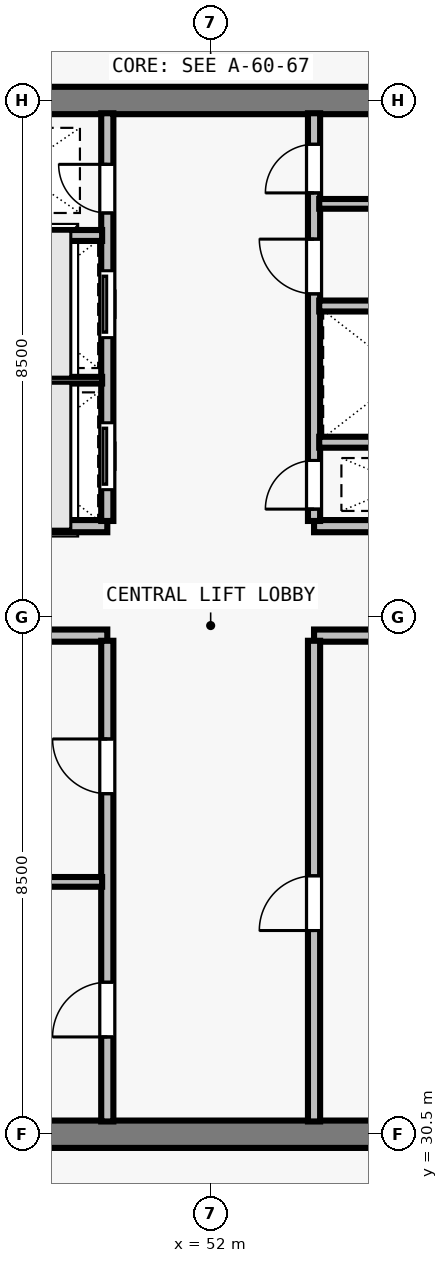
"""IFC4 building model, lengths in metres.
Left out: names, types, materials, properties, quantities, classifications, styles, units other than length and angle.
Written with IfcOpenShell. Run it as: python <this file> out.ifc"""

import sys

from ifc_helpers import new_model, si_unit, direction, frame, frame_2d, origin, place, context, subcontext, project, spatial, rectangle, extrude, element, fill, save


model = new_model("IFC4")
c1 = context("Model", 3, precision=1e-05, world=origin(), true_north=direction((0.0, 1.0)))
c2 = subcontext(c1, "Body", "Model", "MODEL_VIEW")
j1 = project(units=[si_unit("LENGTHUNIT", "METRE"), si_unit("PLANEANGLEUNIT", "RADIAN")], contexts=[c1])
p1 = place(None, origin())
s1 = spatial("IfcSite", under=j1, at=p1, CompositionType="ELEMENT")
p2 = place(p1, origin())
s2 = spatial("IfcBuilding", under=s1, at=p2, CompositionType="ELEMENT")
p3 = place(p2, frame((0.0, 0.0, 234.0)))
s3 = spatial("IfcBuildingStorey", under=s2, at=p3, CompositionType="ELEMENT", Elevation=234.0)
for number, where, z_axis, x_axis in (
    (1, (43.275, 30.5, 0.0), (0.0, 0.0, 1.0), (1.0, 0.0, 0.0)),
    (2, (43.275, 47.5, 0.0), (0.0, 0.0, 1.0), (1.0, 0.0, 0.0)),
):
    element("IfcWall", number, at=place(p3, frame(where, z_axis=z_axis, x_axis=x_axis)), inside=s3, PredefinedType="SHEAR", context=c2, shape_type="SweptSolid", body=[
        extrude(rectangle(XDim=17.45, YDim=0.45, at=frame_2d((8.725, 0.0))), origin(), (0.0, 0.0, 1.0), 3.29),
    ])
for number, where, z_axis, x_axis in (
    (3, (47.35, 38.7, 0.0), (0.0, 0.0, 1.0), (1.0, 0.0, 0.0)),
    (4, (47.35, 40.5, 0.0), (0.0, 0.0, 1.0), (1.0, 0.0, 0.0)),
    (5, (53.7, 38.7, 0.0), (0.0, 0.0, 1.0), (1.0, 0.0, 0.0)),
    (6, (53.7, 40.5, 0.0), (0.0, 0.0, 1.0), (1.0, 0.0, 0.0)),
):
    element("IfcWall", number, at=place(p3, frame(where, z_axis=z_axis, x_axis=x_axis)), inside=s3, PredefinedType="SOLIDWALL", context=c2, shape_type="SweptSolid", body=[
        extrude(rectangle(XDim=2.95, YDim=0.2, at=frame_2d((1.475, 0.0))), origin(), (0.0, 0.0, 1.0), 3.29),
    ])
p4 = place(p3, frame((50.3, 30.71, 0.0), z_axis=(0.0, 0.0, 1.0), x_axis=(0.0, 1.0, 0.0)))
e7 = element("IfcWall", 7, at=p4, inside=s3, PredefinedType="SOLIDWALL", context=c2, shape_type="SweptSolid", body=[
    extrude(rectangle(XDim=7.905, YDim=0.2, at=frame_2d((3.953, 0.0))), origin(), (0.0, 0.0, 1.0), 3.29),
])
p5 = place(p4, frame((1.39, 0.0, 0.0)))
e8 = element("IfcOpeningElement", 8, at=p5, cuts=e7, PredefinedType="OPENING", context=c2, shape_type="SweptSolid", body=[
    extrude(rectangle(XDim=0.9, YDim=2.12, at=frame_2d((0.45, 1.06))), frame((0.0, 0.11, 0.0), z_axis=(0.0, -1.0, 0.0), x_axis=(1.0, 0.0, 0.0)), (0.0, 0.0, 1.0), 0.22),
])
p6 = place(p4, frame((5.39, 0.0, 0.0)))
e9 = element("IfcOpeningElement", 9, at=p6, cuts=e7, PredefinedType="OPENING", context=c2, shape_type="SweptSolid", body=[
    extrude(rectangle(XDim=0.9, YDim=2.12, at=frame_2d((0.45, 1.06))), frame((0.0, 0.11, 0.0), z_axis=(0.0, -1.0, 0.0), x_axis=(1.0, 0.0, 0.0)), (0.0, 0.0, 1.0), 0.22),
])
p7 = place(p3, frame((53.7, 30.71, 0.0), z_axis=(0.0, 0.0, 1.0), x_axis=(0.0, 1.0, 0.0)))
e10 = element("IfcWall", 10, at=p7, inside=s3, PredefinedType="SOLIDWALL", context=c2, shape_type="SweptSolid", body=[
    extrude(rectangle(XDim=7.905, YDim=0.2, at=frame_2d((3.953, 0.0))), origin(), (0.0, 0.0, 1.0), 3.29),
])
p8 = place(p7, frame((3.14, 0.0, 0.0)))
e11 = element("IfcOpeningElement", 11, at=p8, cuts=e10, PredefinedType="OPENING", context=c2, shape_type="SweptSolid", body=[
    extrude(rectangle(XDim=0.9, YDim=2.12, at=frame_2d((0.45, 1.06))), frame((0.0, 0.11, 0.0), z_axis=(0.0, -1.0, 0.0), x_axis=(1.0, 0.0, 0.0)), (0.0, 0.0, 1.0), 0.22),
])
p9 = place(p3, frame((50.3, 40.585, 0.0), z_axis=(0.0, 0.0, 1.0), x_axis=(0.0, 1.0, 0.0)))
e12 = element("IfcWall", 12, at=p9, inside=s3, PredefinedType="SOLIDWALL", context=c2, shape_type="SweptSolid", body=[
    extrude(rectangle(XDim=6.705, YDim=0.2, at=frame_2d((3.353, 0.0))), origin(), (0.0, 0.0, 1.0), 3.29),
])
p10 = place(p9, frame((0.515, 0.0, 0.0)))
e13 = element("IfcOpeningElement", 13, at=p10, cuts=e12, PredefinedType="OPENING", context=c2, shape_type="SweptSolid", body=[
    extrude(rectangle(XDim=1.1, YDim=2.2, at=frame_2d((0.55, 1.1))), frame((0.0, 0.11, 0.0), z_axis=(0.0, -1.0, 0.0), x_axis=(1.0, 0.0, 0.0)), (0.0, 0.0, 1.0), 0.22),
])
p11 = place(p9, frame((3.015, 0.0, 0.0)))
e14 = element("IfcOpeningElement", 14, at=p11, cuts=e12, PredefinedType="OPENING", context=c2, shape_type="SweptSolid", body=[
    extrude(rectangle(XDim=1.1, YDim=2.2, at=frame_2d((0.55, 1.1))), frame((0.0, 0.11, 0.0), z_axis=(0.0, -1.0, 0.0), x_axis=(1.0, 0.0, 0.0)), (0.0, 0.0, 1.0), 0.22),
])
p12 = place(p9, frame((5.065, 0.0, 0.0)))
e15 = element("IfcOpeningElement", 15, at=p12, cuts=e12, PredefinedType="OPENING", context=c2, shape_type="SweptSolid", body=[
    extrude(rectangle(XDim=0.8, YDim=2.08, at=frame_2d((0.4, 1.04))), frame((0.0, 0.11, 0.0), z_axis=(0.0, -1.0, 0.0), x_axis=(1.0, 0.0, 0.0)), (0.0, 0.0, 1.0), 0.22),
])
p13 = place(p3, frame((53.7, 40.585, 0.0), z_axis=(0.0, 0.0, 1.0), x_axis=(0.0, 1.0, 0.0)))
e16 = element("IfcWall", 16, at=p13, inside=s3, PredefinedType="SOLIDWALL", context=c2, shape_type="SweptSolid", body=[
    extrude(rectangle(XDim=6.705, YDim=0.2, at=frame_2d((3.353, 0.0))), origin(), (0.0, 0.0, 1.0), 3.29),
])
p14 = place(p13, frame((0.195, 0.0, 0.0)))
e17 = element("IfcOpeningElement", 17, at=p14, cuts=e16, PredefinedType="OPENING", context=c2, shape_type="SweptSolid", body=[
    extrude(rectangle(XDim=0.8, YDim=2.08, at=frame_2d((0.4, 1.04))), frame((0.0, 0.11, 0.0), z_axis=(0.0, -1.0, 0.0), x_axis=(1.0, 0.0, 0.0)), (0.0, 0.0, 1.0), 0.22),
])
p15 = place(p13, frame((3.735, 0.0, 0.0)))
e18 = element("IfcOpeningElement", 18, at=p15, cuts=e16, PredefinedType="OPENING", context=c2, shape_type="SweptSolid", body=[
    extrude(rectangle(XDim=0.9, YDim=2.12, at=frame_2d((0.45, 1.06))), frame((0.0, 0.11, 0.0), z_axis=(0.0, -1.0, 0.0), x_axis=(1.0, 0.0, 0.0)), (0.0, 0.0, 1.0), 0.22),
])
p16 = place(p13, frame((5.395, 0.0, 0.0)))
e19 = element("IfcOpeningElement", 19, at=p16, cuts=e16, PredefinedType="OPENING", context=c2, shape_type="SweptSolid", body=[
    extrude(rectangle(XDim=0.8, YDim=2.1, at=frame_2d((0.4, 1.05))), frame((0.0, 0.11, 0.0), z_axis=(0.0, -1.0, 0.0), x_axis=(1.0, 0.0, 0.0)), (0.0, 0.0, 1.0), 0.22),
])
p17 = place(p3, frame((47.415, 34.65, 0.0), z_axis=(0.0, 0.0, 1.0), x_axis=(1.0, 0.0, 0.0)))
e20 = element("IfcWall", 20, at=p17, inside=s3, PredefinedType="PARTITIONING", context=c2, shape_type="SweptSolid", body=[
    extrude(rectangle(XDim=2.8, YDim=0.16, at=frame_2d((1.4, 0.0))), origin(), (0.0, 0.0, 1.0), 3.29),
])
p18 = place(p3, frame((47.435, 42.9, 0.0), z_axis=(0.0, 0.0, 1.0), x_axis=(1.0, 0.0, 0.0)))
e21 = element("IfcWall", 21, at=p18, inside=s3, PredefinedType="PARTITIONING", context=c2, shape_type="SweptSolid", body=[
    extrude(rectangle(XDim=2.78, YDim=0.11, at=frame_2d((1.39, 0.0))), origin(), (0.0, 0.0, 1.0), 3.29),
])
p19 = place(p3, frame((47.425, 45.28, 0.0), z_axis=(0.0, 0.0, 1.0), x_axis=(1.0, 0.0, 0.0)))
e22 = element("IfcWall", 22, at=p19, inside=s3, PredefinedType="SOLIDWALL", context=c2, shape_type="SweptSolid", body=[
    extrude(rectangle(XDim=2.79, YDim=0.18, at=frame_2d((1.395, 0.0))), origin(), (0.0, 0.0, 1.0), 3.29),
])
p20 = place(p3, frame((53.785, 41.88, 0.0), z_axis=(0.0, 0.0, 1.0), x_axis=(1.0, 0.0, 0.0)))
e23 = element("IfcWall", 23, at=p20, inside=s3, PredefinedType="SOLIDWALL", context=c2, shape_type="SweptSolid", body=[
    extrude(rectangle(XDim=2.78, YDim=0.18, at=frame_2d((1.39, 0.0))), origin(), (0.0, 0.0, 1.0), 3.29),
])
p21 = place(p3, frame((53.785, 44.12, 0.0), z_axis=(0.0, 0.0, 1.0), x_axis=(1.0, 0.0, 0.0)))
e24 = element("IfcWall", 24, at=p21, inside=s3, PredefinedType="SOLIDWALL", context=c2, shape_type="SweptSolid", body=[
    extrude(rectangle(XDim=2.79, YDim=0.18, at=frame_2d((1.395, 0.0))), origin(), (0.0, 0.0, 1.0), 3.29),
])
p22 = place(p3, frame((53.785, 45.8, 0.0), z_axis=(0.0, 0.0, 1.0), x_axis=(1.0, 0.0, 0.0)))
e25 = element("IfcWall", 25, at=p22, inside=s3, PredefinedType="PARTITIONING", context=c2, shape_type="SweptSolid", body=[
    extrude(rectangle(XDim=2.79, YDim=0.16, at=frame_2d((1.395, 0.0))), origin(), (0.0, 0.0, 1.0), 3.29),
])
p23 = place(p5, origin())
e26 = element("IfcDoor", 26, at=p23, inside=s3, OperationType="SINGLE_SWING_LEFT", PredefinedType="DOOR", context=c2, shape_type="SweptSolid", body=[
    extrude(rectangle(XDim=0.9, YDim=2.12, at=frame_2d((0.45, 1.06))), frame((0.0, 0.025, 0.0), z_axis=(0.0, -1.0, 0.0), x_axis=(1.0, 0.0, 0.0)), (0.0, 0.0, 1.0), 0.05),
])
fill(e8, e26)
p24 = place(p6, origin())
e27 = element("IfcDoor", 27, at=p24, inside=s3, OperationType="SINGLE_SWING_RIGHT", PredefinedType="DOOR", context=c2, shape_type="SweptSolid", body=[
    extrude(rectangle(XDim=0.9, YDim=2.12, at=frame_2d((0.45, 1.06))), frame((0.0, 0.025, 0.0), z_axis=(0.0, -1.0, 0.0), x_axis=(1.0, 0.0, 0.0)), (0.0, 0.0, 1.0), 0.05),
])
fill(e9, e27)
p25 = place(p8, origin())
e28 = element("IfcDoor", 28, at=p25, inside=s3, OperationType="SINGLE_SWING_LEFT", PredefinedType="DOOR", context=c2, shape_type="SweptSolid", body=[
    extrude(rectangle(XDim=0.9, YDim=2.12, at=frame_2d((0.45, 1.06))), frame((0.0, 0.025, 0.0), z_axis=(0.0, -1.0, 0.0), x_axis=(1.0, 0.0, 0.0)), (0.0, 0.0, 1.0), 0.05),
])
fill(e11, e28)
p26 = place(p10, origin())
e29 = element("IfcDoor", 29, at=p26, inside=s3, OperationType="SLIDING_TO_LEFT", PredefinedType="DOOR", context=c2, shape_type="SweptSolid", body=[
    extrude(rectangle(XDim=1.1, YDim=2.2, at=frame_2d((0.55, 1.1))), frame((0.0, 0.025, 0.0), z_axis=(0.0, -1.0, 0.0), x_axis=(1.0, 0.0, 0.0)), (0.0, 0.0, 1.0), 0.05),
])
fill(e13, e29)
p27 = place(p11, origin())
e30 = element("IfcDoor", 30, at=p27, inside=s3, OperationType="SLIDING_TO_LEFT", PredefinedType="DOOR", context=c2, shape_type="SweptSolid", body=[
    extrude(rectangle(XDim=1.1, YDim=2.2, at=frame_2d((0.55, 1.1))), frame((0.0, 0.025, 0.0), z_axis=(0.0, -1.0, 0.0), x_axis=(1.0, 0.0, 0.0)), (0.0, 0.0, 1.0), 0.05),
])
fill(e14, e30)
p28 = place(p12, origin())
e31 = element("IfcDoor", 31, at=p28, inside=s3, OperationType="SINGLE_SWING_RIGHT", PredefinedType="DOOR", context=c2, shape_type="SweptSolid", body=[
    extrude(rectangle(XDim=0.8, YDim=2.08, at=frame_2d((0.4, 1.04))), frame((0.0, 0.025, 0.0), z_axis=(0.0, -1.0, 0.0), x_axis=(1.0, 0.0, 0.0)), (0.0, 0.0, 1.0), 0.05),
])
fill(e15, e31)
p29 = place(p14, origin())
e32 = element("IfcDoor", 32, at=p29, inside=s3, OperationType="SINGLE_SWING_LEFT", PredefinedType="DOOR", context=c2, shape_type="SweptSolid", body=[
    extrude(rectangle(XDim=0.8, YDim=2.08, at=frame_2d((0.4, 1.04))), frame((0.0, 0.025, 0.0), z_axis=(0.0, -1.0, 0.0), x_axis=(1.0, 0.0, 0.0)), (0.0, 0.0, 1.0), 0.05),
])
fill(e17, e32)
p30 = place(p15, origin())
e33 = element("IfcDoor", 33, at=p30, inside=s3, OperationType="SINGLE_SWING_RIGHT", PredefinedType="DOOR", context=c2, shape_type="SweptSolid", body=[
    extrude(rectangle(XDim=0.9, YDim=2.12, at=frame_2d((0.45, 1.06))), frame((0.0, 0.025, 0.0), z_axis=(0.0, -1.0, 0.0), x_axis=(1.0, 0.0, 0.0)), (0.0, 0.0, 1.0), 0.05),
])
fill(e18, e33)
p31 = place(p16, origin())
e34 = element("IfcDoor", 34, at=p31, inside=s3, OperationType="SINGLE_SWING_LEFT", PredefinedType="DOOR", context=c2, shape_type="SweptSolid", body=[
    extrude(rectangle(XDim=0.8, YDim=2.1, at=frame_2d((0.4, 1.05))), frame((0.0, 0.025, 0.0), z_axis=(0.0, -1.0, 0.0), x_axis=(1.0, 0.0, 0.0)), (0.0, 0.0, 1.0), 0.05),
])
fill(e19, e34)
save(model, sys.argv[1])
